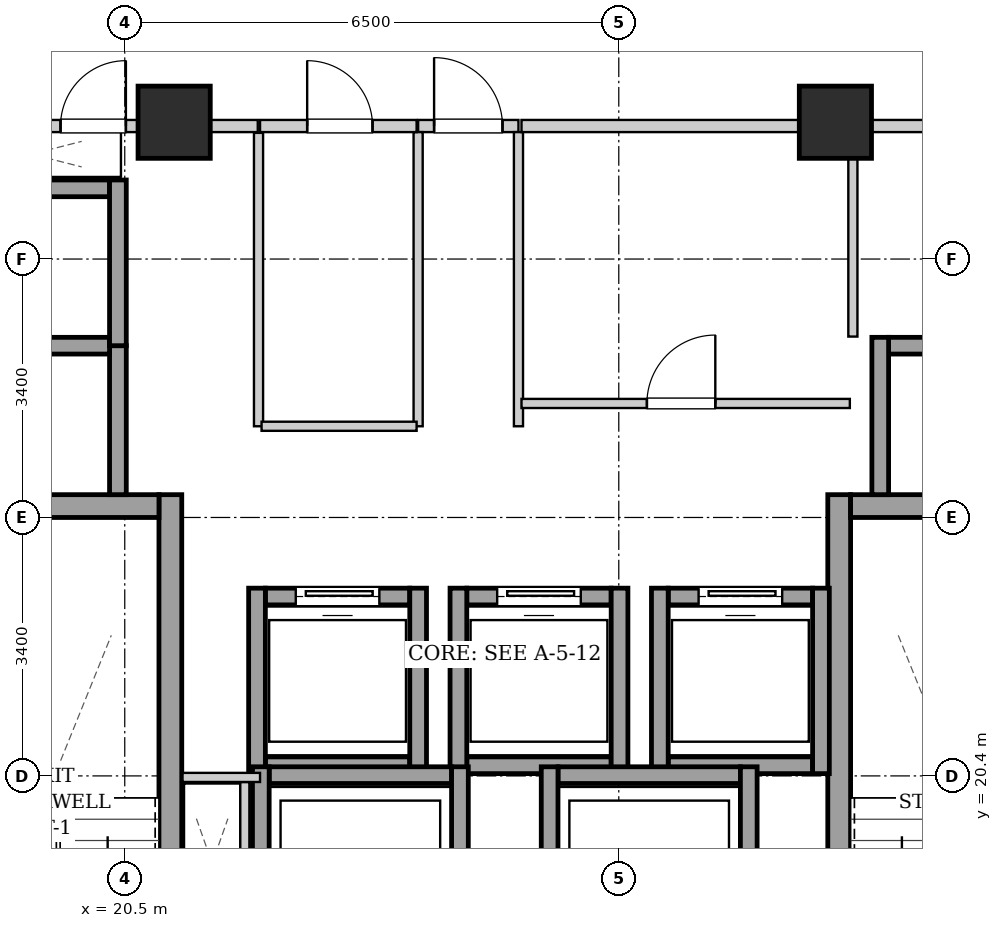
"""IFC4 building model, lengths in metres.
Left out: names, types, materials, properties, quantities, classifications, styles, units other than length and angle.
Written with IfcOpenShell. Run it as: python <this file> out.ifc"""

import sys

from ifc_helpers import new_model, si_unit, direction, frame, frame_2d, origin, origin_2d, place, context, subcontext, project, spatial, rectangle, extrude, element, fill, save


model = new_model("IFC4")
c1 = context("Model", 3, precision=1e-05, world=origin(), true_north=direction((0.0, 1.0)))
c2 = subcontext(c1, "Body", "Model", "MODEL_VIEW")
j1 = project(units=[si_unit("LENGTHUNIT", "METRE"), si_unit("PLANEANGLEUNIT", "RADIAN")], contexts=[c1])
p1 = place(None, origin())
s1 = spatial("IfcSite", under=j1, at=p1, CompositionType="ELEMENT")
p2 = place(p1, origin())
s2 = spatial("IfcBuilding", under=s1, at=p2, CompositionType="ELEMENT")
p3 = place(p2, frame((0.0, 0.0, 169.9)))
s3 = spatial("IfcBuildingStorey", under=s2, at=p3, CompositionType="ELEMENT", Elevation=169.9)
for number, where, z_axis, x_axis in (
    (1, (21.15, 29.0, 0.0), (0.0, 0.0, 1.0), (1.0, 0.0, 0.0)),
    (2, (29.85, 29.0, 0.0), (0.0, 0.0, 1.0), (1.0, 0.0, 0.0)),
):
    element("IfcColumn", number, at=place(p3, frame(where, z_axis=z_axis, x_axis=x_axis)), inside=s3, PredefinedType="COLUMN", context=c2, shape_type="SweptSolid", body=[
        extrude(rectangle(XDim=0.95, YDim=0.95, at=origin_2d()), origin(), (0.0, 0.0, 1.0), 4.5),
    ])
p4 = place(p3, frame((21.1, 15.1, 0.0), z_axis=(0.0, 0.0, 1.0), x_axis=(0.0, 1.0, 0.0)))
e3 = element("IfcWall", 3, at=p4, inside=s3, PredefinedType="SHEAR", context=c2, shape_type="SweptSolid", body=[
    extrude(rectangle(XDim=9.0, YDim=0.3, at=frame_2d((4.5, 0.0))), origin(), (0.0, 0.0, 1.0), 4.18),
])
p5 = place(p3, frame((18.1, 23.95, 0.0), z_axis=(0.0, 0.0, 1.0), x_axis=(1.0, 0.0, 0.0)))
e4 = element("IfcWall", 4, at=p5, inside=s3, PredefinedType="SHEAR", context=c2, shape_type="SweptSolid", body=[
    extrude(rectangle(XDim=2.85, YDim=0.3, at=frame_2d((1.425, 0.0))), origin(), (0.0, 0.0, 1.0), 4.18),
])
p6 = place(p3, frame((29.9, 15.1, 0.0), z_axis=(0.0, 0.0, 1.0), x_axis=(0.0, 1.0, 0.0)))
e5 = element("IfcWall", 5, at=p6, inside=s3, PredefinedType="SHEAR", context=c2, shape_type="SweptSolid", body=[
    extrude(rectangle(XDim=9.0, YDim=0.3, at=frame_2d((4.5, 0.0))), origin(), (0.0, 0.0, 1.0), 4.18),
])
p7 = place(p3, frame((30.05, 23.95, 0.0), z_axis=(0.0, 0.0, 1.0), x_axis=(1.0, 0.0, 0.0)))
e6 = element("IfcWall", 6, at=p7, inside=s3, PredefinedType="SHEAR", context=c2, shape_type="SweptSolid", body=[
    extrude(rectangle(XDim=2.85, YDim=0.3, at=frame_2d((1.425, 0.0))), origin(), (0.0, 0.0, 1.0), 4.18),
])
p8 = place(p3, frame((22.35, 20.54, 0.0), z_axis=(0.0, 0.0, 1.0), x_axis=(1.0, 0.0, 0.0)))
e7 = element("IfcWall", 7, at=p8, inside=s3, PredefinedType="SHEAR", context=c2, shape_type="SweptSolid", body=[
    extrude(rectangle(XDim=1.9, YDim=0.22, at=frame_2d((0.95, 0.0))), origin(), (0.0, 0.0, 1.0), 4.18),
])
p9 = place(p3, frame((22.35, 22.76, 0.0), z_axis=(0.0, 0.0, 1.0), x_axis=(1.0, 0.0, 0.0)))
e8 = element("IfcWall", 8, at=p9, inside=s3, PredefinedType="SHEAR", context=c2, shape_type="SweptSolid", body=[
    extrude(rectangle(XDim=1.9, YDim=0.22, at=frame_2d((0.95, 0.0))), origin(), (0.0, 0.0, 1.0), 4.18),
])
p10 = place(p9, frame((0.4, 0.0, 0.0)))
e9 = element("IfcOpeningElement", 9, at=p10, cuts=e8, PredefinedType="OPENING", context=c2, shape_type="SweptSolid", body=[
    extrude(rectangle(XDim=1.1, YDim=2.15, at=frame_2d((0.55, 1.075))), frame((0.0, 0.12, 0.0), z_axis=(0.0, -1.0, 0.0), x_axis=(1.0, 0.0, 0.0)), (0.0, 0.0, 1.0), 0.24),
])
for number, where, z_axis, x_axis in (
    (10, (22.24, 20.43, 0.0), (0.0, 0.0, 1.0), (0.0, 1.0, 0.0)),
    (11, (24.36, 20.43, 0.0), (0.0, 0.0, 1.0), (0.0, 1.0, 0.0)),
):
    element("IfcWall", number, at=place(p3, frame(where, z_axis=z_axis, x_axis=x_axis)), inside=s3, PredefinedType="SHEAR", context=c2, shape_type="SweptSolid", body=[
        extrude(rectangle(XDim=2.44, YDim=0.22, at=frame_2d((1.22, 0.0))), origin(), (0.0, 0.0, 1.0), 4.18),
    ])
p11 = place(p3, frame((25.0, 20.54, 0.0), z_axis=(0.0, 0.0, 1.0), x_axis=(1.0, 0.0, 0.0)))
e12 = element("IfcWall", 12, at=p11, inside=s3, PredefinedType="SHEAR", context=c2, shape_type="SweptSolid", body=[
    extrude(rectangle(XDim=1.9, YDim=0.22, at=frame_2d((0.95, 0.0))), origin(), (0.0, 0.0, 1.0), 4.18),
])
p12 = place(p3, frame((25.0, 22.76, 0.0), z_axis=(0.0, 0.0, 1.0), x_axis=(1.0, 0.0, 0.0)))
e13 = element("IfcWall", 13, at=p12, inside=s3, PredefinedType="SHEAR", context=c2, shape_type="SweptSolid", body=[
    extrude(rectangle(XDim=1.9, YDim=0.22, at=frame_2d((0.95, 0.0))), origin(), (0.0, 0.0, 1.0), 4.18),
])
p13 = place(p12, frame((0.4, 0.0, 0.0)))
e14 = element("IfcOpeningElement", 14, at=p13, cuts=e13, PredefinedType="OPENING", context=c2, shape_type="SweptSolid", body=[
    extrude(rectangle(XDim=1.1, YDim=2.15, at=frame_2d((0.55, 1.075))), frame((0.0, 0.12, 0.0), z_axis=(0.0, -1.0, 0.0), x_axis=(1.0, 0.0, 0.0)), (0.0, 0.0, 1.0), 0.24),
])
for number, where, z_axis, x_axis in (
    (15, (24.89, 20.43, 0.0), (0.0, 0.0, 1.0), (0.0, 1.0, 0.0)),
    (16, (27.01, 20.43, 0.0), (0.0, 0.0, 1.0), (0.0, 1.0, 0.0)),
):
    element("IfcWall", number, at=place(p3, frame(where, z_axis=z_axis, x_axis=x_axis)), inside=s3, PredefinedType="SHEAR", context=c2, shape_type="SweptSolid", body=[
        extrude(rectangle(XDim=2.44, YDim=0.22, at=frame_2d((1.22, 0.0))), origin(), (0.0, 0.0, 1.0), 4.18),
    ])
p14 = place(p3, frame((27.65, 20.54, 0.0), z_axis=(0.0, 0.0, 1.0), x_axis=(1.0, 0.0, 0.0)))
e17 = element("IfcWall", 17, at=p14, inside=s3, PredefinedType="SHEAR", context=c2, shape_type="SweptSolid", body=[
    extrude(rectangle(XDim=1.9, YDim=0.22, at=frame_2d((0.95, 0.0))), origin(), (0.0, 0.0, 1.0), 4.18),
])
p15 = place(p3, frame((27.65, 22.76, 0.0), z_axis=(0.0, 0.0, 1.0), x_axis=(1.0, 0.0, 0.0)))
e18 = element("IfcWall", 18, at=p15, inside=s3, PredefinedType="SHEAR", context=c2, shape_type="SweptSolid", body=[
    extrude(rectangle(XDim=1.9, YDim=0.22, at=frame_2d((0.95, 0.0))), origin(), (0.0, 0.0, 1.0), 4.18),
])
p16 = place(p15, frame((0.4, 0.0, 0.0)))
e19 = element("IfcOpeningElement", 19, at=p16, cuts=e18, PredefinedType="OPENING", context=c2, shape_type="SweptSolid", body=[
    extrude(rectangle(XDim=1.1, YDim=2.15, at=frame_2d((0.55, 1.075))), frame((0.0, 0.12, 0.0), z_axis=(0.0, -1.0, 0.0), x_axis=(1.0, 0.0, 0.0)), (0.0, 0.0, 1.0), 0.24),
])
for number, where, z_axis, x_axis in (
    (20, (27.54, 20.43, 0.0), (0.0, 0.0, 1.0), (0.0, 1.0, 0.0)),
    (21, (29.66, 20.43, 0.0), (0.0, 0.0, 1.0), (0.0, 1.0, 0.0)),
):
    element("IfcWall", number, at=place(p3, frame(where, z_axis=z_axis, x_axis=x_axis)), inside=s3, PredefinedType="SHEAR", context=c2, shape_type="SweptSolid", body=[
        extrude(rectangle(XDim=2.44, YDim=0.22, at=frame_2d((1.22, 0.0))), origin(), (0.0, 0.0, 1.0), 4.18),
    ])
p17 = place(p3, frame((20.41, 24.1, 0.0), z_axis=(0.0, 0.0, 1.0), x_axis=(0.0, 1.0, 0.0)))
e22 = element("IfcWall", 22, at=p17, inside=s3, PredefinedType="SHEAR", context=c2, shape_type="SweptSolid", body=[
    extrude(rectangle(XDim=1.96, YDim=0.22, at=frame_2d((0.98, 0.0))), origin(), (0.0, 0.0, 1.0), 4.18),
])
for number, where, z_axis, x_axis in (
    (23, (18.4, 26.06, 0.0), (0.0, 0.0, 1.0), (1.0, 0.0, 0.0)),
    (24, (18.4, 28.13, 0.0), (0.0, 0.0, 1.0), (1.0, 0.0, 0.0)),
):
    element("IfcWall", number, at=place(p3, frame(where, z_axis=z_axis, x_axis=x_axis)), inside=s3, PredefinedType="SHEAR", context=c2, shape_type="SweptSolid", body=[
        extrude(rectangle(XDim=1.9, YDim=0.22, at=frame_2d((0.95, 0.0))), origin(), (0.0, 0.0, 1.0), 4.18),
    ])
p18 = place(p3, frame((20.41, 26.06, 0.0), z_axis=(0.0, 0.0, 1.0), x_axis=(0.0, 1.0, 0.0)))
e25 = element("IfcWall", 25, at=p18, inside=s3, PredefinedType="SHEAR", context=c2, shape_type="SweptSolid", body=[
    extrude(rectangle(XDim=2.18, YDim=0.22, at=frame_2d((1.09, 0.0))), origin(), (0.0, 0.0, 1.0), 4.18),
])
p19 = place(p3, frame((30.55, 26.06, 0.0), z_axis=(0.0, 0.0, 1.0), x_axis=(1.0, 0.0, 0.0)))
e26 = element("IfcWall", 26, at=p19, inside=s3, PredefinedType="SHEAR", context=c2, shape_type="SweptSolid", body=[
    extrude(rectangle(XDim=1.9, YDim=0.22, at=frame_2d((0.95, 0.0))), origin(), (0.0, 0.0, 1.0), 4.18),
])
p20 = place(p3, frame((30.44, 24.1, 0.0), z_axis=(0.0, 0.0, 1.0), x_axis=(0.0, 1.0, 0.0)))
e27 = element("IfcWall", 27, at=p20, inside=s3, PredefinedType="SHEAR", context=c2, shape_type="SweptSolid", body=[
    extrude(rectangle(XDim=2.07, YDim=0.22, at=frame_2d((1.035, 0.0))), origin(), (0.0, 0.0, 1.0), 4.18),
])
p21 = place(p3, frame((22.4, 20.41, 0.0), z_axis=(0.0, 0.0, 1.0), x_axis=(1.0, 0.0, 0.0)))
e28 = element("IfcWall", 28, at=p21, inside=s3, PredefinedType="SHEAR", context=c2, shape_type="SweptSolid", body=[
    extrude(rectangle(XDim=2.4, YDim=0.22, at=frame_2d((1.2, 0.0))), origin(), (0.0, 0.0, 1.0), 4.18),
])
for number, where, z_axis, x_axis in (
    (29, (22.29, 17.98, 0.0), (0.0, 0.0, 1.0), (0.0, 1.0, 0.0)),
    (30, (24.91, 17.98, 0.0), (0.0, 0.0, 1.0), (0.0, 1.0, 0.0)),
):
    element("IfcWall", number, at=place(p3, frame(where, z_axis=z_axis, x_axis=x_axis)), inside=s3, PredefinedType="SHEAR", context=c2, shape_type="SweptSolid", body=[
        extrude(rectangle(XDim=2.54, YDim=0.22, at=frame_2d((1.27, 0.0))), origin(), (0.0, 0.0, 1.0), 4.18),
    ])
p22 = place(p3, frame((26.2, 20.41, 0.0), z_axis=(0.0, 0.0, 1.0), x_axis=(1.0, 0.0, 0.0)))
e31 = element("IfcWall", 31, at=p22, inside=s3, PredefinedType="SHEAR", context=c2, shape_type="SweptSolid", body=[
    extrude(rectangle(XDim=2.4, YDim=0.22, at=frame_2d((1.2, 0.0))), origin(), (0.0, 0.0, 1.0), 4.18),
])
for number, where, z_axis, x_axis in (
    (32, (26.09, 17.98, 0.0), (0.0, 0.0, 1.0), (0.0, 1.0, 0.0)),
    (33, (28.71, 17.98, 0.0), (0.0, 0.0, 1.0), (0.0, 1.0, 0.0)),
):
    element("IfcWall", number, at=place(p3, frame(where, z_axis=z_axis, x_axis=x_axis)), inside=s3, PredefinedType="SHEAR", context=c2, shape_type="SweptSolid", body=[
        extrude(rectangle(XDim=2.54, YDim=0.22, at=frame_2d((1.27, 0.0))), origin(), (0.0, 0.0, 1.0), 4.18),
    ])
p23 = place(p3, frame((24.36, 28.95, 0.0), z_axis=(0.0, 0.0, 1.0), x_axis=(1.0, 0.0, 0.0)))
e34 = element("IfcWall", 34, at=p23, inside=s3, PredefinedType="PARTITIONING", context=c2, shape_type="SweptSolid", body=[
    extrude(rectangle(XDim=1.32, YDim=0.16, at=frame_2d((0.66, 0.0))), origin(), (0.0, 0.0, 1.0), 4.18),
])
p24 = place(p23, frame((0.21, 0.0, 0.0)))
e35 = element("IfcOpeningElement", 35, at=p24, cuts=e34, PredefinedType="OPENING", context=c2, shape_type="SweptSolid", body=[
    extrude(rectangle(XDim=0.9, YDim=2.05, at=frame_2d((0.45, 1.025))), frame((0.0, 0.09, 0.0), z_axis=(0.0, -1.0, 0.0), x_axis=(1.0, 0.0, 0.0)), (0.0, 0.0, 1.0), 0.18),
])
p25 = place(p3, frame((17.96, 28.95, 0.0), z_axis=(0.0, 0.0, 1.0), x_axis=(1.0, 0.0, 0.0)))
e36 = element("IfcWall", 36, at=p25, inside=s3, PredefinedType="PARTITIONING", context=c2, shape_type="SweptSolid", body=[
    extrude(rectangle(XDim=4.29, YDim=0.16, at=frame_2d((2.145, 0.0))), origin(), (0.0, 0.0, 1.0), 4.18),
])
p26 = place(p25, frame((1.695, 0.0, 0.0)))
e37 = element("IfcOpeningElement", 37, at=p26, cuts=e36, PredefinedType="OPENING", context=c2, shape_type="SweptSolid", body=[
    extrude(rectangle(XDim=0.86, YDim=2.05, at=frame_2d((0.43, 1.025))), frame((0.0, 0.09, 0.0), z_axis=(0.0, -1.0, 0.0), x_axis=(1.0, 0.0, 0.0)), (0.0, 0.0, 1.0), 0.18),
])
p27 = place(p3, frame((22.08, 18.2, 0.0), z_axis=(0.0, 0.0, 1.0), x_axis=(0.0, 1.0, 0.0)))
e38 = element("IfcWall", 38, at=p27, inside=s3, PredefinedType="PARTITIONING", context=c2, shape_type="SweptSolid", body=[
    extrude(rectangle(XDim=2.12, YDim=0.12, at=frame_2d((1.06, 0.0))), origin(), (0.0, 0.0, 1.0), 4.18),
])
p28 = place(p3, frame((22.28, 20.38, 0.0), z_axis=(0.0, 0.0, 1.0), x_axis=(-1.0, 0.0, 0.0)))
e39 = element("IfcWall", 39, at=p28, inside=s3, PredefinedType="PARTITIONING", context=c2, shape_type="SweptSolid", body=[
    extrude(rectangle(XDim=1.02, YDim=0.12, at=frame_2d((0.51, 0.0))), origin(), (0.0, 0.0, 1.0), 4.18),
])
for number, where, z_axis, x_axis in (
    (40, (24.36, 25.0, 0.0), (0.0, 0.0, 1.0), (0.0, 1.0, 0.0)),
    (41, (25.68, 25.0, 0.0), (0.0, 0.0, 1.0), (0.0, 1.0, 0.0)),
):
    element("IfcWall", number, at=place(p3, frame(where, z_axis=z_axis, x_axis=x_axis)), inside=s3, PredefinedType="PARTITIONING", context=c2, shape_type="SweptSolid", body=[
        extrude(rectangle(XDim=3.87, YDim=0.12, at=frame_2d((1.935, 0.0))), origin(), (0.0, 0.0, 1.0), 4.18),
    ])
p29 = place(p3, frame((30.08, 26.18, 0.0), z_axis=(0.0, 0.0, 1.0), x_axis=(0.0, 1.0, 0.0)))
e42 = element("IfcWall", 42, at=p29, inside=s3, PredefinedType="PARTITIONING", context=c2, shape_type="SweptSolid", body=[
    extrude(rectangle(XDim=2.68, YDim=0.12, at=frame_2d((1.34, 0.0))), origin(), (0.0, 0.0, 1.0), 4.18),
])
p30 = place(p3, frame((22.26, 25.0, 0.0), z_axis=(0.0, 0.0, 1.0), x_axis=(0.0, 1.0, 0.0)))
e43 = element("IfcWall", 43, at=p30, inside=s3, PredefinedType="PARTITIONING", context=c2, shape_type="SweptSolid", body=[
    extrude(rectangle(XDim=3.86, YDim=0.12, at=frame_2d((1.93, 0.0))), origin(), (0.0, 0.0, 1.0), 4.18),
])
p31 = place(p3, frame((22.3, 25.0, 0.0), z_axis=(0.0, 0.0, 1.0), x_axis=(1.0, 0.0, 0.0)))
e44 = element("IfcWall", 44, at=p31, inside=s3, PredefinedType="PARTITIONING", context=c2, shape_type="SweptSolid", body=[
    extrude(rectangle(XDim=2.04, YDim=0.12, at=frame_2d((1.02, 0.0))), origin(), (0.0, 0.0, 1.0), 4.18),
])
p32 = place(p3, frame((22.28, 28.95, 0.0), z_axis=(0.0, 0.0, 1.0), x_axis=(1.0, 0.0, 0.0)))
e45 = element("IfcWall", 45, at=p32, inside=s3, PredefinedType="PARTITIONING", context=c2, shape_type="SweptSolid", body=[
    extrude(rectangle(XDim=2.06, YDim=0.16, at=frame_2d((1.03, 0.0))), origin(), (0.0, 0.0, 1.0), 4.18),
])
p33 = place(p32, frame((0.62, 0.0, 0.0)))
e46 = element("IfcOpeningElement", 46, at=p33, cuts=e45, PredefinedType="OPENING", context=c2, shape_type="SweptSolid", body=[
    extrude(rectangle(XDim=0.86, YDim=2.05, at=frame_2d((0.43, 1.025))), frame((0.0, 0.09, 0.0), z_axis=(0.0, -1.0, 0.0), x_axis=(1.0, 0.0, 0.0)), (0.0, 0.0, 1.0), 0.18),
])
p34 = place(p3, frame((25.72, 28.95, 0.0), z_axis=(0.0, 0.0, 1.0), x_axis=(1.0, 0.0, 0.0)))
e47 = element("IfcWall", 47, at=p34, inside=s3, PredefinedType="PARTITIONING", context=c2, shape_type="SweptSolid", body=[
    extrude(rectangle(XDim=4.32, YDim=0.16, at=frame_2d((2.16, 0.0))), origin(), (0.0, 0.0, 1.0), 4.18),
])
p35 = place(p3, frame((25.72, 25.3, 0.0), z_axis=(0.0, 0.0, 1.0), x_axis=(1.0, 0.0, 0.0)))
e48 = element("IfcWall", 48, at=p35, inside=s3, PredefinedType="PARTITIONING", context=c2, shape_type="SweptSolid", body=[
    extrude(rectangle(XDim=4.32, YDim=0.12, at=frame_2d((2.16, 0.0))), origin(), (0.0, 0.0, 1.0), 4.18),
])
p36 = place(p35, frame((1.65, 0.0, 0.0)))
e49 = element("IfcOpeningElement", 49, at=p36, cuts=e48, PredefinedType="OPENING", context=c2, shape_type="SweptSolid", body=[
    extrude(rectangle(XDim=0.9, YDim=2.05, at=frame_2d((0.45, 1.025))), frame((0.0, 0.07, 0.0), z_axis=(0.0, -1.0, 0.0), x_axis=(1.0, 0.0, 0.0)), (0.0, 0.0, 1.0), 0.14),
])
p37 = place(p3, frame((30.08, 28.95, 0.0), z_axis=(0.0, 0.0, 1.0), x_axis=(1.0, 0.0, 0.0)))
e50 = element("IfcWall", 50, at=p37, inside=s3, PredefinedType="PARTITIONING", context=c2, shape_type="SweptSolid", body=[
    extrude(rectangle(XDim=2.96, YDim=0.16, at=frame_2d((1.48, 0.0))), origin(), (0.0, 0.0, 1.0), 4.18),
])
p38 = place(p37, frame((1.045, 0.0, 0.0)))
e51 = element("IfcOpeningElement", 51, at=p38, cuts=e50, PredefinedType="OPENING", context=c2, shape_type="SweptSolid", body=[
    extrude(rectangle(XDim=0.86, YDim=2.05, at=frame_2d((0.43, 1.025))), frame((0.0, 0.09, 0.0), z_axis=(0.0, -1.0, 0.0), x_axis=(1.0, 0.0, 0.0)), (0.0, 0.0, 1.0), 0.18),
])
p39 = place(p10, origin())
e52 = element("IfcDoor", 52, at=p39, inside=s3, OperationType="SLIDING_TO_LEFT", PredefinedType="DOOR", context=c2, shape_type="SweptSolid", body=[
    extrude(rectangle(XDim=1.1, YDim=2.15, at=frame_2d((0.55, 1.075))), frame((0.0, 0.025, 0.0), z_axis=(0.0, -1.0, 0.0), x_axis=(1.0, 0.0, 0.0)), (0.0, 0.0, 1.0), 0.05),
])
fill(e9, e52)
p40 = place(p13, origin())
e53 = element("IfcDoor", 53, at=p40, inside=s3, OperationType="SLIDING_TO_LEFT", PredefinedType="DOOR", context=c2, shape_type="SweptSolid", body=[
    extrude(rectangle(XDim=1.1, YDim=2.15, at=frame_2d((0.55, 1.075))), frame((0.0, 0.025, 0.0), z_axis=(0.0, -1.0, 0.0), x_axis=(1.0, 0.0, 0.0)), (0.0, 0.0, 1.0), 0.05),
])
fill(e14, e53)
p41 = place(p16, origin())
e54 = element("IfcDoor", 54, at=p41, inside=s3, OperationType="SLIDING_TO_LEFT", PredefinedType="DOOR", context=c2, shape_type="SweptSolid", body=[
    extrude(rectangle(XDim=1.1, YDim=2.15, at=frame_2d((0.55, 1.075))), frame((0.0, 0.025, 0.0), z_axis=(0.0, -1.0, 0.0), x_axis=(1.0, 0.0, 0.0)), (0.0, 0.0, 1.0), 0.05),
])
fill(e19, e54)
p42 = place(p24, origin())
e55 = element("IfcDoor", 55, at=p42, inside=s3, OperationType="SINGLE_SWING_LEFT", PredefinedType="DOOR", context=c2, shape_type="SweptSolid", body=[
    extrude(rectangle(XDim=0.9, YDim=2.05, at=frame_2d((0.45, 1.025))), frame((0.0, 0.025, 0.0), z_axis=(0.0, -1.0, 0.0), x_axis=(1.0, 0.0, 0.0)), (0.0, 0.0, 1.0), 0.05),
])
fill(e35, e55)
p43 = place(p26, origin())
e56 = element("IfcDoor", 56, at=p43, inside=s3, OperationType="SINGLE_SWING_RIGHT", PredefinedType="DOOR", context=c2, shape_type="SweptSolid", body=[
    extrude(rectangle(XDim=0.86, YDim=2.05, at=frame_2d((0.43, 1.025))), frame((0.0, 0.025, 0.0), z_axis=(0.0, -1.0, 0.0), x_axis=(1.0, 0.0, 0.0)), (0.0, 0.0, 1.0), 0.05),
])
fill(e37, e56)
p44 = place(p33, origin())
e57 = element("IfcDoor", 57, at=p44, inside=s3, OperationType="SINGLE_SWING_LEFT", PredefinedType="DOOR", context=c2, shape_type="SweptSolid", body=[
    extrude(rectangle(XDim=0.86, YDim=2.05, at=frame_2d((0.43, 1.025))), frame((0.0, 0.025, 0.0), z_axis=(0.0, -1.0, 0.0), x_axis=(1.0, 0.0, 0.0)), (0.0, 0.0, 1.0), 0.05),
])
fill(e46, e57)
p45 = place(p36, origin())
e58 = element("IfcDoor", 58, at=p45, inside=s3, OperationType="SINGLE_SWING_RIGHT", PredefinedType="DOOR", context=c2, shape_type="SweptSolid", body=[
    extrude(rectangle(XDim=0.9, YDim=2.05, at=frame_2d((0.45, 1.025))), frame((0.0, 0.025, 0.0), z_axis=(0.0, -1.0, 0.0), x_axis=(1.0, 0.0, 0.0)), (0.0, 0.0, 1.0), 0.05),
])
fill(e49, e58)
save(model, sys.argv[1])
